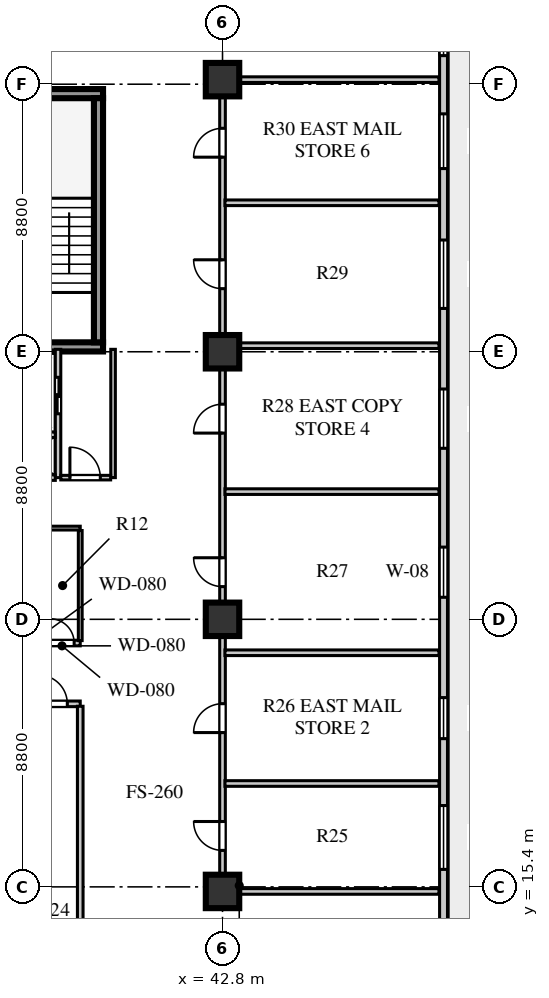
"""IFC4 building model, lengths in metres.
Left out: names, types, materials, properties, quantities, classifications, styles, units other than length and angle.
Written with IfcOpenShell. Run it as: python <this file> out.ifc"""

import sys

from ifc_helpers import new_model, si_unit, direction, frame, frame_2d, origin, origin_2d, place, context, subcontext, project, spatial, rectangle, extrude, element, fill, save


model = new_model("IFC4")
c1 = context("Model", 3, precision=1e-05, world=origin(), true_north=direction((0.0, 1.0)))
c2 = subcontext(c1, "Body", "Model", "MODEL_VIEW")
j1 = project(units=[si_unit("LENGTHUNIT", "METRE"), si_unit("PLANEANGLEUNIT", "RADIAN")], contexts=[c1])
p1 = place(None, origin())
s1 = spatial("IfcSite", under=j1, at=p1, CompositionType="ELEMENT")
p2 = place(p1, origin())
s2 = spatial("IfcBuilding", under=s1, at=p2, CompositionType="ELEMENT")
p3 = place(p2, frame((0.0, 0.0, 82.0)))
s3 = spatial("IfcBuildingStorey", under=s2, at=p3, CompositionType="ELEMENT", Elevation=82.0)
for number, where, z_axis, x_axis in (
    (1, (34.35, 33.16, 0.0), (0.0, 0.0, 1.0), (1.0, 0.0, 0.0)),
    (2, (34.35, 41.49, 0.0), (0.0, 0.0, 1.0), (1.0, 0.0, 0.0)),
):
    element("IfcWall", number, at=place(p3, frame(where, z_axis=z_axis, x_axis=x_axis)), inside=s3, PredefinedType="SHEAR", context=c2, shape_type="SweptSolid", body=[
        extrude(rectangle(XDim=4.52, YDim=0.3, at=frame_2d((2.26, 0.0))), origin(), (0.0, 0.0, 1.0), 3.74),
    ])
p4 = place(p3, frame((38.72, 33.31, 0.0), z_axis=(0.0, 0.0, 1.0), x_axis=(0.0, 1.0, 0.0)))
e3 = element("IfcWall", 3, at=p4, inside=s3, PredefinedType="SHEAR", context=c2, shape_type="SweptSolid", body=[
    extrude(rectangle(XDim=8.03, YDim=0.3, at=frame_2d((4.015, 0.0))), origin(), (0.0, 0.0, 1.0), 3.74),
])
for number, where, z_axis, x_axis in (
    (4, (42.8, 15.25, 0.0), (0.0, 0.0, 1.0), (1.0, 0.0, 0.0)),
    (5, (42.8, 24.2, 0.0), (0.0, 0.0, 1.0), (1.0, 0.0, 0.0)),
    (6, (42.8, 33.0, 0.0), (0.0, 0.0, 1.0), (1.0, 0.0, 0.0)),
    (7, (42.8, 41.95, 0.0), (0.0, 0.0, 1.0), (1.0, 0.0, 0.0)),
):
    element("IfcColumn", number, at=place(p3, frame(where, z_axis=z_axis, x_axis=x_axis)), inside=s3, PredefinedType="COLUMN", context=c2, shape_type="SweptSolid", body=[
        extrude(rectangle(XDim=1.1, YDim=1.1, at=origin_2d()), origin(), (0.0, 0.0, 1.0), 3.74),
    ])
p5 = place(p3, frame((50.07, 12.06, 0.0), z_axis=(0.0, 0.0, 1.0), x_axis=(0.0, 1.0, 0.0)))
e8 = element("IfcWall", 8, at=p5, inside=s3, PredefinedType="SOLIDWALL", context=c2, shape_type="SweptSolid", body=[
    extrude(rectangle(XDim=33.08, YDim=0.26, at=frame_2d((16.54, 0.0))), origin(), (0.0, 0.0, 1.0), 3.74),
])
p6 = place(p5, frame((0.69, 0.0, 0.0)))
e9 = element("IfcOpeningElement", 9, at=p6, cuts=e8, PredefinedType="OPENING", context=c2, shape_type="SweptSolid", body=[
    extrude(rectangle(XDim=1.0, YDim=2.05, at=frame_2d((0.5, 1.025))), frame((0.0, 0.14, 0.0), z_axis=(0.0, -1.0, 0.0), x_axis=(1.0, 0.0, 0.0)), (0.0, 0.0, 1.0), 0.28),
])
p7 = place(p5, frame((3.915, 0.0, 0.8)))
e10 = element("IfcOpeningElement", 10, at=p7, cuts=e8, PredefinedType="OPENING", context=c2, shape_type="SweptSolid", body=[
    extrude(rectangle(XDim=2.1, YDim=1.95, at=frame_2d((1.05, 0.975))), frame((0.0, 0.14, 0.0), z_axis=(0.0, -1.0, 0.0), x_axis=(1.0, 0.0, 0.0)), (0.0, 0.0, 1.0), 0.28),
])
p8 = place(p5, frame((8.215, 0.0, 0.8)))
e11 = element("IfcOpeningElement", 11, at=p8, cuts=e8, PredefinedType="OPENING", context=c2, shape_type="SweptSolid", body=[
    extrude(rectangle(XDim=1.35, YDim=1.9, at=frame_2d((0.675, 0.95))), frame((0.0, 0.14, 0.0), z_axis=(0.0, -1.0, 0.0), x_axis=(1.0, 0.0, 0.0)), (0.0, 0.0, 1.0), 0.28),
])
p9 = place(p5, frame((12.865, 0.0, 0.8)))
e12 = element("IfcOpeningElement", 12, at=p9, cuts=e8, PredefinedType="OPENING", context=c2, shape_type="SweptSolid", body=[
    extrude(rectangle(XDim=1.65, YDim=1.95, at=frame_2d((0.825, 0.975))), frame((0.0, 0.14, 0.0), z_axis=(0.0, -1.0, 0.0), x_axis=(1.0, 0.0, 0.0)), (0.0, 0.0, 1.0), 0.28),
])
p10 = place(p5, frame((17.765, 0.0, 0.8)))
e13 = element("IfcOpeningElement", 13, at=p10, cuts=e8, PredefinedType="OPENING", context=c2, shape_type="SweptSolid", body=[
    extrude(rectangle(XDim=1.95, YDim=2.0, at=frame_2d((0.975, 1.0))), frame((0.0, 0.14, 0.0), z_axis=(0.0, -1.0, 0.0), x_axis=(1.0, 0.0, 0.0)), (0.0, 0.0, 1.0), 0.28),
])
p11 = place(p5, frame((22.365, 0.0, 0.8)))
e14 = element("IfcOpeningElement", 14, at=p11, cuts=e8, PredefinedType="OPENING", context=c2, shape_type="SweptSolid", body=[
    extrude(rectangle(XDim=2.25, YDim=2.0, at=frame_2d((1.125, 1.0))), frame((0.0, 0.14, 0.0), z_axis=(0.0, -1.0, 0.0), x_axis=(1.0, 0.0, 0.0)), (0.0, 0.0, 1.0), 0.28),
])
p12 = place(p5, frame((26.965, 0.0, 0.8)))
e15 = element("IfcOpeningElement", 15, at=p12, cuts=e8, PredefinedType="OPENING", context=c2, shape_type="SweptSolid", body=[
    extrude(rectangle(XDim=1.8, YDim=2.0, at=frame_2d((0.9, 1.0))), frame((0.0, 0.14, 0.0), z_axis=(0.0, -1.0, 0.0), x_axis=(1.0, 0.0, 0.0)), (0.0, 0.0, 1.0), 0.28),
])
p13 = place(p5, frame((30.68, 0.0, 0.8)))
e16 = element("IfcOpeningElement", 16, at=p13, cuts=e8, PredefinedType="OPENING", context=c2, shape_type="SweptSolid", body=[
    extrude(rectangle(XDim=1.5, YDim=2.0, at=frame_2d((0.75, 1.0))), frame((0.0, 0.14, 0.0), z_axis=(0.0, -1.0, 0.0), x_axis=(1.0, 0.0, 0.0)), (0.0, 0.0, 1.0), 0.28),
])
p14 = place(p3, frame((37.39, 28.86, 0.0), z_axis=(0.0, 0.0, 1.0), x_axis=(0.0, 1.0, 0.0)))
e17 = element("IfcWall", 17, at=p14, inside=s3, PredefinedType="SOLIDWALL", context=c2, shape_type="SweptSolid", body=[
    extrude(rectangle(XDim=4.22, YDim=0.18, at=frame_2d((2.11, 0.0))), origin(), (0.0, 0.0, 1.0), 3.74),
])
p15 = place(p14, frame((2.1, 0.0, 0.0)))
e18 = element("IfcOpeningElement", 18, at=p15, cuts=e17, PredefinedType="OPENING", context=c2, shape_type="SweptSolid", body=[
    extrude(rectangle(XDim=1.2, YDim=2.12, at=frame_2d((0.6, 1.06))), frame((0.0, 0.1, 0.0), z_axis=(0.0, -1.0, 0.0), x_axis=(1.0, 0.0, 0.0)), (0.0, 0.0, 1.0), 0.2),
])
for number, where, z_axis, x_axis in (
    (19, (35.05, 28.86, 0.0), (0.0, 0.0, 1.0), (1.0, 0.0, 0.0)),
    (20, (35.05, 30.27, 0.0), (0.0, 0.0, 1.0), (1.0, 0.0, 0.0)),
):
    element("IfcWall", number, at=place(p3, frame(where, z_axis=z_axis, x_axis=x_axis)), inside=s3, PredefinedType="SOLIDWALL", context=c2, shape_type="SweptSolid", body=[
        extrude(rectangle(XDim=2.25, YDim=0.18, at=frame_2d((1.125, 0.0))), origin(), (0.0, 0.0, 1.0), 3.74),
    ])
p16 = place(p3, frame((39.2, 28.86, 0.0), z_axis=(0.0, 0.0, 1.0), x_axis=(0.0, 1.0, 0.0)))
e21 = element("IfcWall", 21, at=p16, inside=s3, PredefinedType="PARTITIONING", context=c2, shape_type="SweptSolid", body=[
    extrude(rectangle(XDim=4.22, YDim=0.15, at=frame_2d((2.11, 0.0))), origin(), (0.0, 0.0, 1.0), 3.74),
])
p17 = place(p3, frame((37.48, 28.86, 0.0), z_axis=(0.0, 0.0, 1.0), x_axis=(1.0, 0.0, 0.0)))
e22 = element("IfcWall", 22, at=p17, inside=s3, PredefinedType="PARTITIONING", context=c2, shape_type="SweptSolid", body=[
    extrude(rectangle(XDim=1.64, YDim=0.15, at=frame_2d((0.82, 0.0))), origin(), (0.0, 0.0, 1.0), 3.74),
])
p18 = place(p17, frame((0.3, 0.0, 0.0)))
e23 = element("IfcOpeningElement", 23, at=p18, cuts=e22, PredefinedType="OPENING", context=c2, shape_type="SweptSolid", body=[
    extrude(rectangle(XDim=1.0, YDim=2.1, at=frame_2d((0.5, 1.05))), frame((0.0, 0.085, 0.0), z_axis=(0.0, -1.0, 0.0), x_axis=(1.0, 0.0, 0.0)), (0.0, 0.0, 1.0), 0.17),
])
p19 = place(p3, frame((25.25, 21.42, 0.0), z_axis=(0.0, 0.0, 1.0), x_axis=(1.0, 0.0, 0.0)))
e24 = element("IfcWall", 24, at=p19, inside=s3, PredefinedType="SOLIDWALL", context=c2, shape_type="SweptSolid", body=[
    extrude(rectangle(XDim=12.87, YDim=0.185, at=frame_2d((6.435, 0.0))), origin(), (0.0, 0.0, 1.0), 3.34),
])
p20 = place(p19, frame((0.725, 0.0, 0.0)))
e25 = element("IfcOpeningElement", 25, at=p20, cuts=e24, PredefinedType="OPENING", context=c2, shape_type="SweptSolid", body=[
    extrude(rectangle(XDim=0.95, YDim=2.08, at=frame_2d((0.475, 1.04))), frame((0.0, 0.103, 0.0), z_axis=(0.0, -1.0, 0.0), x_axis=(1.0, 0.0, 0.0)), (0.0, 0.0, 1.0), 0.205),
])
p21 = place(p19, frame((3.025, 0.0, 0.0)))
e26 = element("IfcOpeningElement", 26, at=p21, cuts=e24, PredefinedType="OPENING", context=c2, shape_type="SweptSolid", body=[
    extrude(rectangle(XDim=0.95, YDim=2.08, at=frame_2d((0.475, 1.04))), frame((0.0, 0.103, 0.0), z_axis=(0.0, -1.0, 0.0), x_axis=(1.0, 0.0, 0.0)), (0.0, 0.0, 1.0), 0.205),
])
p22 = place(p19, frame((5.325, 0.0, 0.0)))
e27 = element("IfcOpeningElement", 27, at=p22, cuts=e24, PredefinedType="OPENING", context=c2, shape_type="SweptSolid", body=[
    extrude(rectangle(XDim=0.95, YDim=2.08, at=frame_2d((0.475, 1.04))), frame((0.0, 0.103, 0.0), z_axis=(0.0, -1.0, 0.0), x_axis=(1.0, 0.0, 0.0)), (0.0, 0.0, 1.0), 0.205),
])
p23 = place(p19, frame((7.625, 0.0, 0.0)))
e28 = element("IfcOpeningElement", 28, at=p23, cuts=e24, PredefinedType="OPENING", context=c2, shape_type="SweptSolid", body=[
    extrude(rectangle(XDim=0.95, YDim=2.08, at=frame_2d((0.475, 1.04))), frame((0.0, 0.103, 0.0), z_axis=(0.0, -1.0, 0.0), x_axis=(1.0, 0.0, 0.0)), (0.0, 0.0, 1.0), 0.205),
])
p24 = place(p19, frame((9.725, 0.0, 0.0)))
e29 = element("IfcOpeningElement", 29, at=p24, cuts=e24, PredefinedType="OPENING", context=c2, shape_type="SweptSolid", body=[
    extrude(rectangle(XDim=0.95, YDim=2.08, at=frame_2d((0.475, 1.04))), frame((0.0, 0.103, 0.0), z_axis=(0.0, -1.0, 0.0), x_axis=(1.0, 0.0, 0.0)), (0.0, 0.0, 1.0), 0.205),
])
p25 = place(p19, frame((11.495, 0.0, 0.0)))
e30 = element("IfcOpeningElement", 30, at=p25, cuts=e24, PredefinedType="OPENING", context=c2, shape_type="SweptSolid", body=[
    extrude(rectangle(XDim=0.95, YDim=2.08, at=frame_2d((0.475, 1.04))), frame((0.0, 0.103, 0.0), z_axis=(0.0, -1.0, 0.0), x_axis=(1.0, 0.0, 0.0)), (0.0, 0.0, 1.0), 0.205),
])
p26 = place(p3, frame((38.12, 8.48, 0.0), z_axis=(0.0, 0.0, 1.0), x_axis=(0.0, 1.0, 0.0)))
e31 = element("IfcWall", 31, at=p26, inside=s3, PredefinedType="SOLIDWALL", context=c2, shape_type="SweptSolid", body=[
    extrude(rectangle(XDim=12.86, YDim=0.185, at=frame_2d((6.43, 0.0))), origin(), (0.0, 0.0, 1.0), 3.74),
])
p27 = place(p3, frame((34.6, 23.42, 0.0), z_axis=(0.0, 0.0, 1.0), x_axis=(1.0, 0.0, 0.0)))
e32 = element("IfcWall", 32, at=p27, inside=s3, PredefinedType="SOLIDWALL", context=c2, shape_type="SweptSolid", body=[
    extrude(rectangle(XDim=3.52, YDim=0.185, at=frame_2d((1.76, 0.0))), origin(), (0.0, 0.0, 1.0), 3.74),
])
p28 = place(p27, frame((0.22, 0.0, 0.0)))
e33 = element("IfcOpeningElement", 33, at=p28, cuts=e32, PredefinedType="OPENING", context=c2, shape_type="SweptSolid", body=[
    extrude(rectangle(XDim=0.8, YDim=2.05, at=frame_2d((0.4, 1.025))), frame((0.0, 0.103, 0.0), z_axis=(0.0, -1.0, 0.0), x_axis=(1.0, 0.0, 0.0)), (0.0, 0.0, 1.0), 0.205),
])
p29 = place(p27, frame((1.38, 0.0, 0.0)))
e34 = element("IfcOpeningElement", 34, at=p29, cuts=e32, PredefinedType="OPENING", context=c2, shape_type="SweptSolid", body=[
    extrude(rectangle(XDim=0.8, YDim=2.05, at=frame_2d((0.4, 1.025))), frame((0.0, 0.103, 0.0), z_axis=(0.0, -1.0, 0.0), x_axis=(1.0, 0.0, 0.0)), (0.0, 0.0, 1.0), 0.205),
])
p30 = place(p27, frame((2.52, 0.0, 0.0)))
e35 = element("IfcOpeningElement", 35, at=p30, cuts=e32, PredefinedType="OPENING", context=c2, shape_type="SweptSolid", body=[
    extrude(rectangle(XDim=0.8, YDim=2.05, at=frame_2d((0.4, 1.025))), frame((0.0, 0.103, 0.0), z_axis=(0.0, -1.0, 0.0), x_axis=(1.0, 0.0, 0.0)), (0.0, 0.0, 1.0), 0.205),
])
p31 = place(p3, frame((42.8, 15.25, 0.0), z_axis=(0.0, 0.0, 1.0), x_axis=(0.0, 1.0, 0.0)))
e36 = element("IfcWall", 36, at=p31, inside=s3, PredefinedType="SOLIDWALL", context=c2, shape_type="SweptSolid", body=[
    extrude(rectangle(XDim=26.7, YDim=0.185, at=frame_2d((13.35, 0.0))), origin(), (0.0, 0.0, 1.0), 3.04),
])
p32 = place(p31, frame((1.35, 0.0, 0.0)))
e37 = element("IfcOpeningElement", 37, at=p32, cuts=e36, PredefinedType="OPENING", context=c2, shape_type="SweptSolid", body=[
    extrude(rectangle(XDim=0.95, YDim=2.08, at=frame_2d((0.475, 1.04))), frame((0.0, 0.103, 0.0), z_axis=(0.0, -1.0, 0.0), x_axis=(1.0, 0.0, 0.0)), (0.0, 0.0, 1.0), 0.205),
])
p33 = place(p31, frame((5.225, 0.0, 0.0)))
e38 = element("IfcOpeningElement", 38, at=p33, cuts=e36, PredefinedType="OPENING", context=c2, shape_type="SweptSolid", body=[
    extrude(rectangle(XDim=0.95, YDim=2.08, at=frame_2d((0.475, 1.04))), frame((0.0, 0.103, 0.0), z_axis=(0.0, -1.0, 0.0), x_axis=(1.0, 0.0, 0.0)), (0.0, 0.0, 1.0), 0.205),
])
p34 = place(p31, frame((10.025, 0.0, 0.0)))
e39 = element("IfcOpeningElement", 39, at=p34, cuts=e36, PredefinedType="OPENING", context=c2, shape_type="SweptSolid", body=[
    extrude(rectangle(XDim=0.95, YDim=2.08, at=frame_2d((0.475, 1.04))), frame((0.0, 0.103, 0.0), z_axis=(0.0, -1.0, 0.0), x_axis=(1.0, 0.0, 0.0)), (0.0, 0.0, 1.0), 0.205),
])
p35 = place(p31, frame((15.075, 0.0, 0.0)))
e40 = element("IfcOpeningElement", 40, at=p35, cuts=e36, PredefinedType="OPENING", context=c2, shape_type="SweptSolid", body=[
    extrude(rectangle(XDim=0.95, YDim=2.08, at=frame_2d((0.475, 1.04))), frame((0.0, 0.103, 0.0), z_axis=(0.0, -1.0, 0.0), x_axis=(1.0, 0.0, 0.0)), (0.0, 0.0, 1.0), 0.205),
])
p36 = place(p31, frame((19.825, 0.0, 0.0)))
e41 = element("IfcOpeningElement", 41, at=p36, cuts=e36, PredefinedType="OPENING", context=c2, shape_type="SweptSolid", body=[
    extrude(rectangle(XDim=0.95, YDim=2.08, at=frame_2d((0.475, 1.04))), frame((0.0, 0.103, 0.0), z_axis=(0.0, -1.0, 0.0), x_axis=(1.0, 0.0, 0.0)), (0.0, 0.0, 1.0), 0.205),
])
p37 = place(p31, frame((24.15, 0.0, 0.0)))
e42 = element("IfcOpeningElement", 42, at=p37, cuts=e36, PredefinedType="OPENING", context=c2, shape_type="SweptSolid", body=[
    extrude(rectangle(XDim=0.95, YDim=2.08, at=frame_2d((0.475, 1.04))), frame((0.0, 0.103, 0.0), z_axis=(0.0, -1.0, 0.0), x_axis=(1.0, 0.0, 0.0)), (0.0, 0.0, 1.0), 0.205),
])
for number, where, z_axis, x_axis in (
    (43, (42.88, 15.25, 0.0), (0.0, 0.0, 1.0), (1.0, 0.0, 0.0)),
    (44, (42.88, 41.95, 0.0), (0.0, 0.0, 1.0), (1.0, 0.0, 0.0)),
):
    element("IfcWall", number, at=place(p3, frame(where, z_axis=z_axis, x_axis=x_axis)), inside=s3, PredefinedType="SOLIDWALL", context=c2, shape_type="SweptSolid", body=[
        extrude(rectangle(XDim=7.04, YDim=0.185, at=frame_2d((3.52, 0.0))), origin(), (0.0, 0.0, 1.0), 3.24),
    ])
p38 = place(p3, frame((34.6, 27.2, 0.0), z_axis=(0.0, 0.0, 1.0), x_axis=(1.0, 0.0, 0.0)))
e45 = element("IfcWall", 45, at=p38, inside=s3, PredefinedType="PLUMBINGWALL", context=c2, shape_type="SweptSolid", body=[
    extrude(rectangle(XDim=3.52, YDim=0.125, at=frame_2d((1.76, 0.0))), origin(), (0.0, 0.0, 1.0), 3.34),
])
p39 = place(p3, frame((38.12, 23.5, 0.0), z_axis=(0.0, 0.0, 1.0), x_axis=(0.0, 1.0, 0.0)))
e46 = element("IfcWall", 46, at=p39, inside=s3, PredefinedType="PLUMBINGWALL", context=c2, shape_type="SweptSolid", body=[
    extrude(rectangle(XDim=3.62, YDim=0.125, at=frame_2d((1.81, 0.0))), origin(), (0.0, 0.0, 1.0), 3.74),
])
for number, where, z_axis, x_axis in (
    (47, (42.88, 18.8, 0.0), (0.0, 0.0, 1.0), (1.0, 0.0, 0.0)),
    (48, (42.88, 23.1, 0.0), (0.0, 0.0, 1.0), (1.0, 0.0, 0.0)),
    (49, (42.88, 28.4, 0.0), (0.0, 0.0, 1.0), (1.0, 0.0, 0.0)),
):
    element("IfcWall", number, at=place(p3, frame(where, z_axis=z_axis, x_axis=x_axis)), inside=s3, PredefinedType="SOLIDWALL", context=c2, shape_type="SweptSolid", body=[
        extrude(rectangle(XDim=7.04, YDim=0.185, at=frame_2d((3.52, 0.0))), origin(), (0.0, 0.0, 1.0), 3.74),
    ])
p40 = place(p3, frame((42.88, 33.2, 0.0), z_axis=(0.0, 0.0, 1.0), x_axis=(1.0, 0.0, 0.0)))
e50 = element("IfcWall", 50, at=p40, inside=s3, PredefinedType="SOLIDWALL", context=c2, shape_type="SweptSolid", body=[
    extrude(rectangle(XDim=7.04, YDim=0.185, at=frame_2d((3.52, 0.0))), origin(), (0.0, 0.0, 1.0), 3.24),
])
p41 = place(p3, frame((42.88, 37.9, 0.0), z_axis=(0.0, 0.0, 1.0), x_axis=(1.0, 0.0, 0.0)))
e51 = element("IfcWall", 51, at=p41, inside=s3, PredefinedType="SOLIDWALL", context=c2, shape_type="SweptSolid", body=[
    extrude(rectangle(XDim=7.04, YDim=0.185, at=frame_2d((3.52, 0.0))), origin(), (0.0, 0.0, 1.0), 3.74),
])
p42 = place(p7, origin())
e52 = element("IfcWindow", 52, at=p42, inside=s3, PartitioningType="SINGLE_PANEL", PredefinedType="WINDOW", context=c2, shape_type="SweptSolid", body=[
    extrude(rectangle(XDim=2.1, YDim=1.95, at=frame_2d((1.05, 0.975))), frame((0.0, 0.03, 0.0), z_axis=(0.0, -1.0, 0.0), x_axis=(1.0, 0.0, 0.0)), (0.0, 0.0, 1.0), 0.06),
])
fill(e10, e52)
p43 = place(p8, origin())
e53 = element("IfcWindow", 53, at=p43, inside=s3, PartitioningType="SINGLE_PANEL", PredefinedType="WINDOW", context=c2, shape_type="SweptSolid", body=[
    extrude(rectangle(XDim=1.35, YDim=1.9, at=frame_2d((0.675, 0.95))), frame((0.0, 0.03, 0.0), z_axis=(0.0, -1.0, 0.0), x_axis=(1.0, 0.0, 0.0)), (0.0, 0.0, 1.0), 0.06),
])
fill(e11, e53)
p44 = place(p9, origin())
e54 = element("IfcWindow", 54, at=p44, inside=s3, PartitioningType="SINGLE_PANEL", PredefinedType="WINDOW", context=c2, shape_type="SweptSolid", body=[
    extrude(rectangle(XDim=1.65, YDim=1.95, at=frame_2d((0.825, 0.975))), frame((0.0, 0.03, 0.0), z_axis=(0.0, -1.0, 0.0), x_axis=(1.0, 0.0, 0.0)), (0.0, 0.0, 1.0), 0.06),
])
fill(e12, e54)
p45 = place(p10, origin())
e55 = element("IfcWindow", 55, at=p45, inside=s3, PartitioningType="SINGLE_PANEL", PredefinedType="WINDOW", context=c2, shape_type="SweptSolid", body=[
    extrude(rectangle(XDim=1.95, YDim=2.0, at=frame_2d((0.975, 1.0))), frame((0.0, 0.03, 0.0), z_axis=(0.0, -1.0, 0.0), x_axis=(1.0, 0.0, 0.0)), (0.0, 0.0, 1.0), 0.06),
])
fill(e13, e55)
p46 = place(p11, origin())
e56 = element("IfcWindow", 56, at=p46, inside=s3, PartitioningType="SINGLE_PANEL", PredefinedType="WINDOW", context=c2, shape_type="SweptSolid", body=[
    extrude(rectangle(XDim=2.25, YDim=2.0, at=frame_2d((1.125, 1.0))), frame((0.0, 0.03, 0.0), z_axis=(0.0, -1.0, 0.0), x_axis=(1.0, 0.0, 0.0)), (0.0, 0.0, 1.0), 0.06),
])
fill(e14, e56)
p47 = place(p12, origin())
e57 = element("IfcWindow", 57, at=p47, inside=s3, PartitioningType="SINGLE_PANEL", PredefinedType="WINDOW", context=c2, shape_type="SweptSolid", body=[
    extrude(rectangle(XDim=1.8, YDim=2.0, at=frame_2d((0.9, 1.0))), frame((0.0, 0.03, 0.0), z_axis=(0.0, -1.0, 0.0), x_axis=(1.0, 0.0, 0.0)), (0.0, 0.0, 1.0), 0.06),
])
fill(e15, e57)
p48 = place(p13, origin())
e58 = element("IfcWindow", 58, at=p48, inside=s3, PartitioningType="SINGLE_PANEL", PredefinedType="WINDOW", context=c2, shape_type="SweptSolid", body=[
    extrude(rectangle(XDim=1.5, YDim=2.0, at=frame_2d((0.75, 1.0))), frame((0.0, 0.03, 0.0), z_axis=(0.0, -1.0, 0.0), x_axis=(1.0, 0.0, 0.0)), (0.0, 0.0, 1.0), 0.06),
])
fill(e16, e58)
p49 = place(p15, frame((1.2, 0.0, 0.0), z_axis=(0.0, 0.0, 1.0), x_axis=(-1.0, 0.0, 0.0)))
e59 = element("IfcDoor", 59, at=p49, inside=s3, OperationType="DOUBLE_DOOR_SLIDING", PredefinedType="DOOR", context=c2, shape_type="SweptSolid", body=[
    extrude(rectangle(XDim=1.2, YDim=2.12, at=frame_2d((0.6, 1.06))), frame((0.0, 0.025, 0.0), z_axis=(0.0, -1.0, 0.0), x_axis=(1.0, 0.0, 0.0)), (0.0, 0.0, 1.0), 0.05),
])
fill(e18, e59)
p50 = place(p18, origin())
e60 = element("IfcDoor", 60, at=p50, inside=s3, OperationType="SINGLE_SWING_LEFT", PredefinedType="DOOR", context=c2, shape_type="SweptSolid", body=[
    extrude(rectangle(XDim=1.0, YDim=2.1, at=frame_2d((0.5, 1.05))), frame((0.0, 0.025, 0.0), z_axis=(0.0, -1.0, 0.0), x_axis=(1.0, 0.0, 0.0)), (0.0, 0.0, 1.0), 0.05),
])
fill(e23, e60)
p51 = place(p30, origin())
e61 = element("IfcDoor", 61, at=p51, inside=s3, OperationType="SINGLE_SWING_LEFT", PredefinedType="DOOR", context=c2, shape_type="SweptSolid", body=[
    extrude(rectangle(XDim=0.8, YDim=2.05, at=frame_2d((0.4, 1.025))), frame((0.0, 0.025, 0.0), z_axis=(0.0, -1.0, 0.0), x_axis=(1.0, 0.0, 0.0)), (0.0, 0.0, 1.0), 0.05),
])
fill(e35, e61)
p52 = place(p25, frame((0.95, 0.0, 0.0), z_axis=(0.0, 0.0, 1.0), x_axis=(-1.0, 0.0, 0.0)))
e62 = element("IfcDoor", 62, at=p52, inside=s3, OperationType="SINGLE_SWING_RIGHT", PredefinedType="DOOR", context=c2, shape_type="SweptSolid", body=[
    extrude(rectangle(XDim=0.95, YDim=2.08, at=frame_2d((0.475, 1.04))), frame((0.0, 0.025, 0.0), z_axis=(0.0, -1.0, 0.0), x_axis=(1.0, 0.0, 0.0)), (0.0, 0.0, 1.0), 0.05),
])
fill(e30, e62)
p53 = place(p32, origin())
e63 = element("IfcDoor", 63, at=p53, inside=s3, OperationType="SINGLE_SWING_RIGHT", PredefinedType="DOOR", context=c2, shape_type="SweptSolid", body=[
    extrude(rectangle(XDim=0.95, YDim=2.08, at=frame_2d((0.475, 1.04))), frame((0.0, 0.025, 0.0), z_axis=(0.0, -1.0, 0.0), x_axis=(1.0, 0.0, 0.0)), (0.0, 0.0, 1.0), 0.05),
])
fill(e37, e63)
p54 = place(p33, origin())
e64 = element("IfcDoor", 64, at=p54, inside=s3, OperationType="SINGLE_SWING_LEFT", PredefinedType="DOOR", context=c2, shape_type="SweptSolid", body=[
    extrude(rectangle(XDim=0.95, YDim=2.08, at=frame_2d((0.475, 1.04))), frame((0.0, 0.025, 0.0), z_axis=(0.0, -1.0, 0.0), x_axis=(1.0, 0.0, 0.0)), (0.0, 0.0, 1.0), 0.05),
])
fill(e38, e64)
p55 = place(p34, origin())
e65 = element("IfcDoor", 65, at=p55, inside=s3, OperationType="SINGLE_SWING_RIGHT", PredefinedType="DOOR", context=c2, shape_type="SweptSolid", body=[
    extrude(rectangle(XDim=0.95, YDim=2.08, at=frame_2d((0.475, 1.04))), frame((0.0, 0.025, 0.0), z_axis=(0.0, -1.0, 0.0), x_axis=(1.0, 0.0, 0.0)), (0.0, 0.0, 1.0), 0.05),
])
fill(e39, e65)
p56 = place(p35, origin())
e66 = element("IfcDoor", 66, at=p56, inside=s3, OperationType="SINGLE_SWING_LEFT", PredefinedType="DOOR", context=c2, shape_type="SweptSolid", body=[
    extrude(rectangle(XDim=0.95, YDim=2.08, at=frame_2d((0.475, 1.04))), frame((0.0, 0.025, 0.0), z_axis=(0.0, -1.0, 0.0), x_axis=(1.0, 0.0, 0.0)), (0.0, 0.0, 1.0), 0.05),
])
fill(e40, e66)
p57 = place(p36, origin())
e67 = element("IfcDoor", 67, at=p57, inside=s3, OperationType="SINGLE_SWING_RIGHT", PredefinedType="DOOR", context=c2, shape_type="SweptSolid", body=[
    extrude(rectangle(XDim=0.95, YDim=2.08, at=frame_2d((0.475, 1.04))), frame((0.0, 0.025, 0.0), z_axis=(0.0, -1.0, 0.0), x_axis=(1.0, 0.0, 0.0)), (0.0, 0.0, 1.0), 0.05),
])
fill(e41, e67)
p58 = place(p37, origin())
e68 = element("IfcDoor", 68, at=p58, inside=s3, OperationType="SINGLE_SWING_LEFT", PredefinedType="DOOR", context=c2, shape_type="SweptSolid", body=[
    extrude(rectangle(XDim=0.95, YDim=2.08, at=frame_2d((0.475, 1.04))), frame((0.0, 0.025, 0.0), z_axis=(0.0, -1.0, 0.0), x_axis=(1.0, 0.0, 0.0)), (0.0, 0.0, 1.0), 0.05),
])
fill(e42, e68)
save(model, sys.argv[1])
